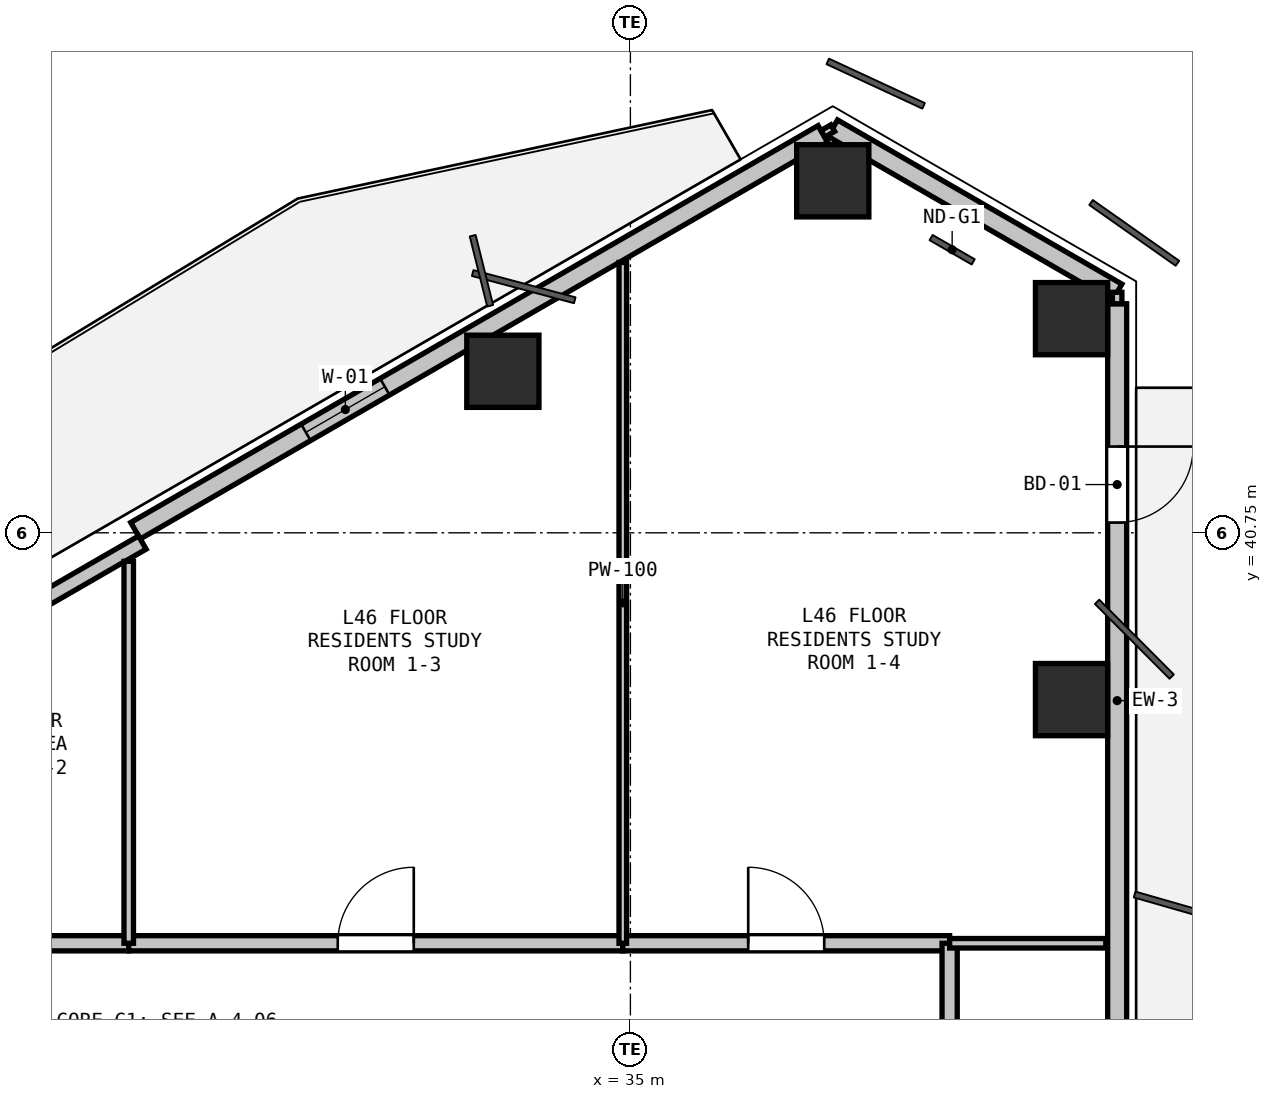
"""IFC4 building model, lengths in metres.
Left out: names, types, materials, properties, quantities, classifications, styles, units other than length and angle.
Written with IfcOpenShell. Run it as: python <this file> out.ifc"""

import sys

from ifc_helpers import new_model, si_unit, direction, frame, frame_2d, origin, origin_2d, place, context, subcontext, project, spatial, rectangle, hollow_rectangle, extrude, element, fill, save


model = new_model("IFC4")
c1 = context("Model", 3, precision=1e-05, world=origin(), true_north=direction((0.0, 1.0)))
c2 = subcontext(c1, "Body", "Model", "MODEL_VIEW")
j1 = project(units=[si_unit("LENGTHUNIT", "METRE"), si_unit("PLANEANGLEUNIT", "RADIAN")], contexts=[c1])
p1 = place(None, origin())
s1 = spatial("IfcSite", under=j1, at=p1, CompositionType="ELEMENT")
p2 = place(p1, origin())
s2 = spatial("IfcBuilding", under=s1, at=p2, CompositionType="ELEMENT")
p3 = place(p2, frame((0.0, 0.0, 167.4)))
s3 = spatial("IfcBuildingStorey", under=s2, at=p3, CompositionType="ELEMENT", Elevation=167.4)
for number, where, z_axis, x_axis in (
    (1, (33.322, 42.875, -0.23), (0.0, 0.0, 1.0), (1.0, 0.0, 0.0)),
    (2, (37.662, 45.381, -0.23), (0.0, 0.0, 1.0), (1.0, 0.0, 0.0)),
    (3, (40.804, 43.567, -0.23), (0.0, 0.0, 1.0), (1.0, 0.0, 0.0)),
    (4, (40.804, 38.556, -0.23), (0.0, 0.0, 1.0), (1.0, 0.0, 0.0)),
):
    element("IfcColumn", number, at=place(p3, frame(where, z_axis=z_axis, x_axis=x_axis)), inside=s3, PredefinedType="COLUMN", context=c2, shape_type="SweptSolid", body=[
        extrude(hollow_rectangle(XDim=0.95, YDim=0.95, WallThickness=0.028, at=origin_2d()), origin(), (0.0, 0.0, 1.0), 3.53),
    ])
p4 = place(p3, frame((37.662, 46.074, 0.0), z_axis=(0.0, 0.0, 1.0), x_axis=(0.866047252008, -0.499962155857, 0.0)))
e5 = element("IfcWall", 5, at=p4, inside=s3, PredefinedType="SOLIDWALL", context=c2, shape_type="SweptSolid", body=[
    extrude(rectangle(XDim=4.32, YDim=0.25, at=frame_2d((2.16, 0.0))), origin(), (0.0, 0.0, 1.0), 2.64),
])
p5 = place(p3, frame((28.489, 40.778, 0.0), z_axis=(0.0, 0.0, 1.0), x_axis=(0.866027516296, 0.499996341005, 0.0)))
e6 = element("IfcWall", 6, at=p5, inside=s3, PredefinedType="SOLIDWALL", context=c2, shape_type="SweptSolid", body=[
    extrude(rectangle(XDim=10.442, YDim=0.25, at=frame_2d((5.221, 0.0))), origin(), (0.0, 0.0, 1.0), 2.64),
])
p6 = place(p5, frame((2.588, 0.0, 0.9)))
e7 = element("IfcOpeningElement", 7, at=p6, cuts=e6, PredefinedType="OPENING", context=c2, shape_type="SweptSolid", body=[
    extrude(rectangle(XDim=1.2, YDim=1.5, at=frame_2d((0.6, 0.75))), frame((0.0, 0.135, 0.0), z_axis=(0.0, -1.0, 0.0), x_axis=(1.0, 0.0, 0.0)), (0.0, 0.0, 1.0), 0.27),
])
p7 = place(p3, frame((27.107, 39.772, 0.0), z_axis=(0.0, 0.0, 1.0), x_axis=(0.866087547558, 0.499892348375, 0.0)))
e8 = element("IfcWall", 8, at=p7, inside=s3, PredefinedType="PARAPET", context=c2, shape_type="SweptSolid", body=[
    extrude(rectangle(XDim=1.7, YDim=0.2, at=frame_2d((0.85, 0.0))), origin(), (0.0, 0.0, 1.0), 2.64),
])
p8 = place(p3, frame((41.404, 43.764, 0.0), z_axis=(0.0, 0.0, 1.0), x_axis=(0.0, -1.0, 0.0)))
e9 = element("IfcWall", 9, at=p8, inside=s3, PredefinedType="SOLIDWALL", context=c2, shape_type="SweptSolid", body=[
    extrude(rectangle(XDim=10.442, YDim=0.25, at=frame_2d((5.221, 0.0))), origin(), (0.0, 0.0, 1.0), 2.64),
])
p9 = place(p8, frame((1.879, 0.0, 0.0)))
e10 = element("IfcOpeningElement", 10, at=p9, cuts=e9, PredefinedType="OPENING", context=c2, shape_type="SweptSolid", body=[
    extrude(rectangle(XDim=1.0, YDim=2.1, at=frame_2d((0.5, 1.05))), frame((0.0, 0.135, 0.0), z_axis=(0.0, -1.0, 0.0), x_axis=(1.0, 0.0, 0.0)), (0.0, 0.0, 1.0), 0.27),
])
p10 = place(p3, frame((25.2, 35.35, 0.0), z_axis=(0.0, 0.0, 1.0), x_axis=(1.0, 0.0, 0.0)))
e11 = element("IfcWall", 11, at=p10, inside=s3, PredefinedType="PARTITIONING", context=c2, shape_type="SweptSolid", body=[
    extrude(rectangle(XDim=3.2, YDim=0.2, at=frame_2d((1.6, 0.0))), origin(), (0.0, 0.0, 1.0), 3.02),
])
p11 = place(p10, frame((1.1, 0.0, 0.0)))
e12 = element("IfcOpeningElement", 12, at=p11, cuts=e11, PredefinedType="OPENING", context=c2, shape_type="SweptSolid", body=[
    extrude(rectangle(XDim=1.0, YDim=2.15, at=frame_2d((0.5, 1.075))), frame((0.0, 0.11, 0.0), z_axis=(0.0, -1.0, 0.0), x_axis=(1.0, 0.0, 0.0)), (0.0, 0.0, 1.0), 0.22),
])
p12 = place(p3, frame((28.4, 35.35, 0.0), z_axis=(0.0, 0.0, 1.0), x_axis=(1.0, 0.0, 0.0)))
e13 = element("IfcWall", 13, at=p12, inside=s3, PredefinedType="PARTITIONING", context=c2, shape_type="SweptSolid", body=[
    extrude(rectangle(XDim=6.5, YDim=0.2, at=frame_2d((3.25, 0.0))), origin(), (0.0, 0.0, 1.0), 3.02),
])
p13 = place(p12, frame((2.75, 0.0, 0.0)))
e14 = element("IfcOpeningElement", 14, at=p13, cuts=e13, PredefinedType="OPENING", context=c2, shape_type="SweptSolid", body=[
    extrude(rectangle(XDim=1.0, YDim=2.15, at=frame_2d((0.5, 1.075))), frame((0.0, 0.11, 0.0), z_axis=(0.0, -1.0, 0.0), x_axis=(1.0, 0.0, 0.0)), (0.0, 0.0, 1.0), 0.22),
])
p14 = place(p3, frame((34.9, 35.35, 0.0), z_axis=(0.0, 0.0, 1.0), x_axis=(1.0, 0.0, 0.0)))
e15 = element("IfcWall", 15, at=p14, inside=s3, PredefinedType="PARTITIONING", context=c2, shape_type="SweptSolid", body=[
    extrude(rectangle(XDim=4.3, YDim=0.2, at=frame_2d((2.15, 0.0))), origin(), (0.0, 0.0, 1.0), 2.469),
])
p15 = place(p14, frame((1.65, 0.0, 0.0)))
e16 = element("IfcOpeningElement", 16, at=p15, cuts=e15, PredefinedType="OPENING", context=c2, shape_type="SweptSolid", body=[
    extrude(rectangle(XDim=1.0, YDim=2.15, at=frame_2d((0.5, 1.075))), frame((0.0, 0.11, 0.0), z_axis=(0.0, -1.0, 0.0), x_axis=(1.0, 0.0, 0.0)), (0.0, 0.0, 1.0), 0.22),
])
p16 = place(p3, frame((39.2, 35.35, 0.0), z_axis=(0.0, 0.0, 1.0), x_axis=(0.0, -1.0, 0.0)))
e17 = element("IfcWall", 17, at=p16, inside=s3, PredefinedType="PARTITIONING", context=c2, shape_type="SweptSolid", body=[
    extrude(rectangle(XDim=2.6, YDim=0.2, at=frame_2d((1.3, 0.0))), origin(), (0.0, 0.0, 1.0), 3.02),
])
p17 = place(p3, frame((28.4, 40.375, 0.0), z_axis=(0.0, 0.0, 1.0), x_axis=(0.0, -1.0, 0.0)))
e18 = element("IfcWall", 18, at=p17, inside=s3, PredefinedType="PARTITIONING", context=c2, shape_type="SweptSolid", body=[
    extrude(rectangle(XDim=5.025, YDim=0.125, at=frame_2d((2.513, 0.0))), origin(), (0.0, 0.0, 1.0), 2.365),
])
p18 = place(p3, frame((34.9, 44.307, 0.0), z_axis=(0.0, 0.0, 1.0), x_axis=(0.0, -1.0, 0.0)))
e19 = element("IfcWall", 19, at=p18, inside=s3, PredefinedType="PARTITIONING", context=c2, shape_type="SweptSolid", body=[
    extrude(rectangle(XDim=8.957, YDim=0.1, at=frame_2d((4.479, 0.0))), origin(), (0.0, 0.0, 1.0), 2.685),
])
p19 = place(p3, frame((41.255, 35.35, 0.0), z_axis=(0.0, 0.0, 1.0), x_axis=(-1.0, 0.0, 0.0)))
e20 = element("IfcWall", 20, at=p19, inside=s3, PredefinedType="PARTITIONING", context=c2, shape_type="SweptSolid", body=[
    extrude(rectangle(XDim=2.055, YDim=0.125, at=frame_2d((1.027, 0.0))), origin(), (0.0, 0.0, 1.0), 2.365),
])
p20 = place(p3, frame((37.532, 45.999, 0.0), z_axis=(0.0, 0.0, 1.0), x_axis=(0.866131372301, 0.499816412211, 0.0)))
e21 = element("IfcWall", 21, at=p20, inside=s3, PredefinedType="PARTITIONING", context=c2, shape_type="SweptSolid", body=[
    extrude(rectangle(XDim=0.15, YDim=0.1, at=frame_2d((0.075, 0.0))), origin(), (0.0, 0.0, 1.0), 3.02),
])
p21 = place(p3, frame((41.404, 43.914, 0.0), z_axis=(0.0, 0.0, 1.0), x_axis=(0.0, -1.0, 0.0)))
e22 = element("IfcWall", 22, at=p21, inside=s3, PredefinedType="PARTITIONING", context=c2, shape_type="SweptSolid", body=[
    extrude(rectangle(XDim=0.15, YDim=0.125, at=frame_2d((0.075, 0.0))), origin(), (0.0, 0.0, 1.0), 3.02),
])
p22 = place(p6, origin())
e23 = element("IfcWindow", 23, at=p22, inside=s3, PartitioningType="SINGLE_PANEL", PredefinedType="WINDOW", context=c2, shape_type="SweptSolid", body=[
    extrude(rectangle(XDim=1.2, YDim=1.5, at=frame_2d((0.6, 0.75))), frame((0.0, 0.03, 0.0), z_axis=(0.0, -1.0, 0.0), x_axis=(1.0, 0.0, 0.0)), (0.0, 0.0, 1.0), 0.06),
])
fill(e7, e23)
p23 = place(p9, origin())
e24 = element("IfcDoor", 24, at=p23, inside=s3, OperationType="SINGLE_SWING_LEFT", PredefinedType="DOOR", context=c2, shape_type="SweptSolid", body=[
    extrude(rectangle(XDim=1.0, YDim=2.1, at=frame_2d((0.5, 1.05))), frame((0.0, 0.025, 0.0), z_axis=(0.0, -1.0, 0.0), x_axis=(1.0, 0.0, 0.0)), (0.0, 0.0, 1.0), 0.05),
])
fill(e10, e24)
p24 = place(p13, origin())
e25 = element("IfcDoor", 25, at=p24, inside=s3, OperationType="SINGLE_SWING_RIGHT", PredefinedType="DOOR", context=c2, shape_type="SweptSolid", body=[
    extrude(rectangle(XDim=1.0, YDim=2.15, at=frame_2d((0.5, 1.075))), frame((0.0, 0.025, 0.0), z_axis=(0.0, -1.0, 0.0), x_axis=(1.0, 0.0, 0.0)), (0.0, 0.0, 1.0), 0.05),
])
fill(e14, e25)
p25 = place(p15, origin())
e26 = element("IfcDoor", 26, at=p25, inside=s3, OperationType="SINGLE_SWING_LEFT", PredefinedType="DOOR", context=c2, shape_type="SweptSolid", body=[
    extrude(rectangle(XDim=1.0, YDim=2.15, at=frame_2d((0.5, 1.075))), frame((0.0, 0.025, 0.0), z_axis=(0.0, -1.0, 0.0), x_axis=(1.0, 0.0, 0.0)), (0.0, 0.0, 1.0), 0.05),
])
fill(e16, e26)
save(model, sys.argv[1])
